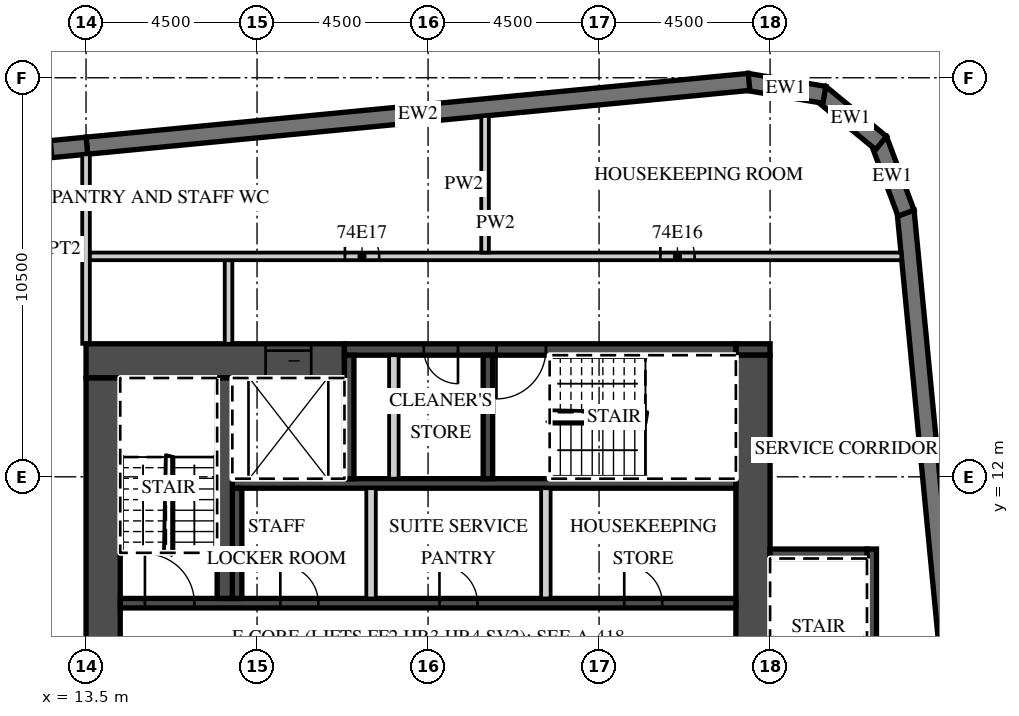
"""IFC4 building model, lengths in metres.
Left out: names, types, materials, properties, quantities, classifications, styles, units other than length and angle.
Written with IfcOpenShell. Run it as: python <this file> out.ifc"""

import sys

from ifc_helpers import new_model, si_unit, direction, frame, frame_2d, origin, place, context, subcontext, project, spatial, polyline, rectangle, outline, extrude, element, fill, save


model = new_model("IFC4")
c1 = context("Model", 3, precision=1e-05, world=origin(), true_north=direction((0.0, 1.0)))
c2 = subcontext(c1, "Body", "Model", "MODEL_VIEW")
j1 = project(units=[si_unit("LENGTHUNIT", "METRE"), si_unit("PLANEANGLEUNIT", "RADIAN")], contexts=[c1])
p1 = place(None, origin())
s1 = spatial("IfcSite", under=j1, at=p1, CompositionType="ELEMENT")
p2 = place(p1, origin())
s2 = spatial("IfcBuilding", under=s1, at=p2, CompositionType="ELEMENT")
p3 = place(p2, frame((0.0, 0.0, 294.9)))
s3 = spatial("IfcBuildingStorey", under=s2, at=p3, CompositionType="ELEMENT", Elevation=294.9)
p4 = place(p3, frame((38.132, -12.858, 0.0), z_axis=(0.0, 0.0, 1.0), x_axis=(-0.095847749461, 0.995396006082, 0.0)))
e1 = element("IfcWall", 1, at=p4, inside=s3, PredefinedType="SOLIDWALL", context=c2, shape_type="SweptSolid", body=[
    extrude(rectangle(XDim=32.0, YDim=0.45, at=frame_2d((16.0, 0.0))), origin(), (0.0, 0.0, 1.0), 3.02),
])
p5 = place(p3, frame((35.078, 18.938, 0.0), z_axis=(0.0, 0.0, 1.0), x_axis=(-0.350192909346, 0.936677599948, 0.0)))
e2 = element("IfcWall", 2, at=p5, inside=s3, PredefinedType="SOLIDWALL", context=c2, shape_type="SweptSolid", body=[
    extrude(outline(polyline([(0.0, -0.225), (2.071, -0.225), (1.95, 0.225), (0.121, 0.225), (0.0, -0.225)])), origin(), (0.0, 0.0, 1.0), 3.02),
])
p6 = place(p3, frame((34.421, 20.782, 0.0), z_axis=(0.0, 0.0, 1.0), x_axis=(-0.771593176315, 0.636116318187, 0.0)))
e3 = element("IfcWall", 3, at=p6, inside=s3, PredefinedType="SOLIDWALL", context=c2, shape_type="SweptSolid", body=[
    extrude(outline(polyline([(0.0, -0.225), (2.071, -0.225), (1.95, 0.225), (0.12, 0.225), (0.0, -0.225)])), origin(), (0.0, 0.0, 1.0), 3.02),
])
p7 = place(p3, frame((32.929, 22.051, 0.0), z_axis=(0.0, 0.0, 1.0), x_axis=(-0.986298144721, 0.164972633245, 0.0)))
e4 = element("IfcWall", 4, at=p7, inside=s3, PredefinedType="SOLIDWALL", context=c2, shape_type="SweptSolid", body=[
    extrude(outline(polyline([(0.0, -0.225), (2.07, -0.225), (1.95, 0.225), (0.121, 0.225), (0.0, -0.225)])), origin(), (0.0, 0.0, 1.0), 3.02),
])
p8 = place(p3, frame((30.946, 22.391, 0.0), z_axis=(0.0, 0.0, 1.0), x_axis=(-0.995396397117, -0.095843688398, 0.0)))
e5 = element("IfcWall", 5, at=p8, inside=s3, PredefinedType="SOLIDWALL", context=c2, shape_type="SweptSolid", body=[
    extrude(rectangle(XDim=17.505, YDim=0.45, at=frame_2d((8.752, 0.0))), origin(), (0.0, 0.0, 1.0), 3.02),
])
p9 = place(p3, frame((13.521, 20.713, 0.0), z_axis=(0.0, 0.0, 1.0), x_axis=(-0.995396277313, -0.095844932638, 0.0)))
e6 = element("IfcWall", 6, at=p9, inside=s3, PredefinedType="SOLIDWALL", context=c2, shape_type="SweptSolid", body=[
    extrude(rectangle(XDim=51.495, YDim=0.45, at=frame_2d((25.748, 0.0))), origin(), (0.0, 0.0, 1.0), 3.02),
])
p10 = place(p9, frame((0.91, 0.0, 0.45)))
e7 = element("IfcOpeningElement", 7, at=p10, cuts=e6, PredefinedType="OPENING", context=c2, shape_type="SweptSolid", body=[
    extrude(rectangle(XDim=2.7, YDim=2.25, at=frame_2d((1.35, 1.125))), frame((0.0, 0.235, 0.0), z_axis=(0.0, -1.0, 0.0), x_axis=(1.0, 0.0, 0.0)), (0.0, 0.0, 1.0), 0.47),
])
p11 = place(p9, frame((5.431, 0.0, 0.45)))
e8 = element("IfcOpeningElement", 8, at=p11, cuts=e6, PredefinedType="OPENING", context=c2, shape_type="SweptSolid", body=[
    extrude(rectangle(XDim=2.7, YDim=2.25, at=frame_2d((1.35, 1.125))), frame((0.0, 0.235, 0.0), z_axis=(0.0, -1.0, 0.0), x_axis=(1.0, 0.0, 0.0)), (0.0, 0.0, 1.0), 0.47),
])
p12 = place(p9, frame((9.952, 0.0, 0.45)))
e9 = element("IfcOpeningElement", 9, at=p12, cuts=e6, PredefinedType="OPENING", context=c2, shape_type="SweptSolid", body=[
    extrude(rectangle(XDim=2.7, YDim=2.25, at=frame_2d((1.35, 1.125))), frame((0.0, 0.235, 0.0), z_axis=(0.0, -1.0, 0.0), x_axis=(1.0, 0.0, 0.0)), (0.0, 0.0, 1.0), 0.47),
])
p13 = place(p9, frame((14.473, 0.0, 0.45)))
e10 = element("IfcOpeningElement", 10, at=p13, cuts=e6, PredefinedType="OPENING", context=c2, shape_type="SweptSolid", body=[
    extrude(rectangle(XDim=2.7, YDim=2.25, at=frame_2d((1.35, 1.125))), frame((0.0, 0.235, 0.0), z_axis=(0.0, -1.0, 0.0), x_axis=(1.0, 0.0, 0.0)), (0.0, 0.0, 1.0), 0.47),
])
p14 = place(p9, frame((18.994, 0.0, 0.45)))
e11 = element("IfcOpeningElement", 11, at=p14, cuts=e6, PredefinedType="OPENING", context=c2, shape_type="SweptSolid", body=[
    extrude(rectangle(XDim=2.7, YDim=2.25, at=frame_2d((1.35, 1.125))), frame((0.0, 0.235, 0.0), z_axis=(0.0, -1.0, 0.0), x_axis=(1.0, 0.0, 0.0)), (0.0, 0.0, 1.0), 0.47),
])
p15 = place(p9, frame((23.514, 0.0, 0.45)))
e12 = element("IfcOpeningElement", 12, at=p15, cuts=e6, PredefinedType="OPENING", context=c2, shape_type="SweptSolid", body=[
    extrude(rectangle(XDim=2.7, YDim=2.25, at=frame_2d((1.35, 1.125))), frame((0.0, 0.235, 0.0), z_axis=(0.0, -1.0, 0.0), x_axis=(1.0, 0.0, 0.0)), (0.0, 0.0, 1.0), 0.47),
])
p16 = place(p9, frame((28.035, 0.0, 0.45)))
e13 = element("IfcOpeningElement", 13, at=p16, cuts=e6, PredefinedType="OPENING", context=c2, shape_type="SweptSolid", body=[
    extrude(rectangle(XDim=2.7, YDim=2.25, at=frame_2d((1.35, 1.125))), frame((0.0, 0.235, 0.0), z_axis=(0.0, -1.0, 0.0), x_axis=(1.0, 0.0, 0.0)), (0.0, 0.0, 1.0), 0.47),
])
p17 = place(p9, frame((32.556, 0.0, 0.45)))
e14 = element("IfcOpeningElement", 14, at=p17, cuts=e6, PredefinedType="OPENING", context=c2, shape_type="SweptSolid", body=[
    extrude(rectangle(XDim=2.7, YDim=2.25, at=frame_2d((1.35, 1.125))), frame((0.0, 0.235, 0.0), z_axis=(0.0, -1.0, 0.0), x_axis=(1.0, 0.0, 0.0)), (0.0, 0.0, 1.0), 0.47),
])
p18 = place(p9, frame((37.077, 0.0, 0.45)))
e15 = element("IfcOpeningElement", 15, at=p18, cuts=e6, PredefinedType="OPENING", context=c2, shape_type="SweptSolid", body=[
    extrude(rectangle(XDim=2.7, YDim=2.25, at=frame_2d((1.35, 1.125))), frame((0.0, 0.235, 0.0), z_axis=(0.0, -1.0, 0.0), x_axis=(1.0, 0.0, 0.0)), (0.0, 0.0, 1.0), 0.47),
])
p19 = place(p9, frame((41.598, 0.0, 0.45)))
e16 = element("IfcOpeningElement", 16, at=p19, cuts=e6, PredefinedType="OPENING", context=c2, shape_type="SweptSolid", body=[
    extrude(rectangle(XDim=2.7, YDim=2.25, at=frame_2d((1.35, 1.125))), frame((0.0, 0.235, 0.0), z_axis=(0.0, -1.0, 0.0), x_axis=(1.0, 0.0, 0.0)), (0.0, 0.0, 1.0), 0.47),
])
p20 = place(p9, frame((46.118, 0.0, 0.45)))
e17 = element("IfcOpeningElement", 17, at=p20, cuts=e6, PredefinedType="OPENING", context=c2, shape_type="SweptSolid", body=[
    extrude(rectangle(XDim=2.7, YDim=2.25, at=frame_2d((1.35, 1.125))), frame((0.0, 0.235, 0.0), z_axis=(0.0, -1.0, 0.0), x_axis=(1.0, 0.0, 0.0)), (0.0, 0.0, 1.0), 0.47),
])
p21 = place(p3, frame((13.5, 15.5, 0.0), z_axis=(0.0, 0.0, 1.0), x_axis=(0.0, 1.0, 0.0)))
e18 = element("IfcWall", 18, at=p21, inside=s3, PredefinedType="PARTITIONING", context=c2, shape_type="SweptSolid", body=[
    extrude(rectangle(XDim=4.985, YDim=0.2, at=frame_2d((2.493, 0.0))), origin(), (0.0, 0.0, 1.0), 3.02),
])
p22 = place(p3, frame((13.5, 15.05, 0.0), z_axis=(0.0, 0.0, 1.0), x_axis=(1.0, 0.0, 0.0)))
e19 = element("IfcWall", 19, at=p22, inside=s3, PredefinedType="SHEAR", context=c2, shape_type="SweptSolid", body=[
    extrude(rectangle(XDim=6.8, YDim=0.9, at=frame_2d((3.4, 0.0))), origin(), (0.0, 0.0, 1.0), 3.02),
])
p23 = place(p22, frame((4.725, 0.0, 0.0)))
e20 = element("IfcOpeningElement", 20, at=p23, cuts=e19, PredefinedType="OPENING", context=c2, shape_type="SweptSolid", body=[
    extrude(rectangle(XDim=1.2, YDim=2.1, at=frame_2d((0.6, 1.05))), frame((0.0, 0.46, 0.0), z_axis=(0.0, -1.0, 0.0), x_axis=(1.0, 0.0, 0.0)), (0.0, 0.0, 1.0), 0.92),
])
p24 = place(p3, frame((30.6, 15.35, 0.0), z_axis=(0.0, 0.0, 1.0), x_axis=(1.0, 0.0, 0.0)))
e21 = element("IfcWall", 21, at=p24, inside=s3, PredefinedType="SHEAR", context=c2, shape_type="SweptSolid", body=[
    extrude(rectangle(XDim=0.9, YDim=0.3, at=frame_2d((0.45, 0.0))), origin(), (0.0, 0.0, 1.0), 3.02),
])
p25 = place(p3, frame((20.3, 15.35, 0.0), z_axis=(0.0, 0.0, 1.0), x_axis=(1.0, 0.0, 0.0)))
e22 = element("IfcWall", 22, at=p25, inside=s3, PredefinedType="SHEAR", context=c2, shape_type="SweptSolid", body=[
    extrude(rectangle(XDim=10.3, YDim=0.3, at=frame_2d((5.15, 0.0))), origin(), (0.0, 0.0, 1.0), 3.02),
])
p26 = place(p25, frame((4.0, 0.0, 0.0)))
e23 = element("IfcOpeningElement", 23, at=p26, cuts=e22, PredefinedType="OPENING", context=c2, shape_type="SweptSolid", body=[
    extrude(rectangle(XDim=1.3, YDim=2.1, at=frame_2d((0.65, 1.05))), frame((0.0, 0.16, 0.0), z_axis=(0.0, -1.0, 0.0), x_axis=(1.0, 0.0, 0.0)), (0.0, 0.0, 1.0), 0.32),
])
p27 = place(p25, frame((2.087, 0.0, 0.0)))
e24 = element("IfcOpeningElement", 24, at=p27, cuts=e22, PredefinedType="OPENING", context=c2, shape_type="SweptSolid", body=[
    extrude(rectangle(XDim=0.9, YDim=2.1, at=frame_2d((0.45, 1.05))), frame((0.0, 0.16, 0.0), z_axis=(0.0, -1.0, 0.0), x_axis=(1.0, 0.0, 0.0)), (0.0, 0.0, 1.0), 0.32),
])
p28 = place(p3, frame((31.05, 2.4, 0.0), z_axis=(0.0, 0.0, 1.0), x_axis=(0.0, 1.0, 0.0)))
e25 = element("IfcWall", 25, at=p28, inside=s3, PredefinedType="SHEAR", context=c2, shape_type="SweptSolid", body=[
    extrude(rectangle(XDim=12.8, YDim=0.9, at=frame_2d((6.4, 0.0))), origin(), (0.0, 0.0, 1.0), 3.02),
])
p29 = place(p28, frame((0.2, 0.0, 0.0)))
e26 = element("IfcOpeningElement", 26, at=p29, cuts=e25, PredefinedType="OPENING", context=c2, shape_type="SweptSolid", body=[
    extrude(rectangle(XDim=1.1, YDim=2.1, at=frame_2d((0.55, 1.05))), frame((0.0, 0.46, 0.0), z_axis=(0.0, -1.0, 0.0), x_axis=(1.0, 0.0, 0.0)), (0.0, 0.0, 1.0), 0.92),
])
p30 = place(p3, frame((13.95, 2.4, 0.0), z_axis=(0.0, 0.0, 1.0), x_axis=(0.0, 1.0, 0.0)))
e27 = element("IfcWall", 27, at=p30, inside=s3, PredefinedType="SHEAR", context=c2, shape_type="SweptSolid", body=[
    extrude(rectangle(XDim=12.2, YDim=0.9, at=frame_2d((6.1, 0.0))), origin(), (0.0, 0.0, 1.0), 3.02),
])
p31 = place(p3, frame((14.4, 8.675, 0.0), z_axis=(0.0, 0.0, 1.0), x_axis=(1.0, 0.0, 0.0)))
e28 = element("IfcWall", 28, at=p31, inside=s3, PredefinedType="SHEAR", context=c2, shape_type="SweptSolid", body=[
    extrude(rectangle(XDim=16.2, YDim=0.25, at=frame_2d((8.1, 0.0))), origin(), (0.0, 0.0, 1.0), 3.02),
])
p32 = place(p31, frame((0.65, 0.0, 0.0)))
e29 = element("IfcOpeningElement", 29, at=p32, cuts=e28, PredefinedType="OPENING", context=c2, shape_type="SweptSolid", body=[
    extrude(rectangle(XDim=1.3, YDim=2.1, at=frame_2d((0.65, 1.05))), frame((0.0, 0.135, 0.0), z_axis=(0.0, -1.0, 0.0), x_axis=(1.0, 0.0, 0.0)), (0.0, 0.0, 1.0), 0.27),
])
p33 = place(p31, frame((13.262, 0.0, 0.0)))
e30 = element("IfcOpeningElement", 30, at=p33, cuts=e28, PredefinedType="OPENING", context=c2, shape_type="SweptSolid", body=[
    extrude(rectangle(XDim=1.0, YDim=2.1, at=frame_2d((0.5, 1.05))), frame((0.0, 0.135, 0.0), z_axis=(0.0, -1.0, 0.0), x_axis=(1.0, 0.0, 0.0)), (0.0, 0.0, 1.0), 0.27),
])
p34 = place(p31, frame((8.4, 0.0, 0.0)))
e31 = element("IfcOpeningElement", 31, at=p34, cuts=e28, PredefinedType="OPENING", context=c2, shape_type="SweptSolid", body=[
    extrude(rectangle(XDim=1.0, YDim=2.1, at=frame_2d((0.5, 1.05))), frame((0.0, 0.135, 0.0), z_axis=(0.0, -1.0, 0.0), x_axis=(1.0, 0.0, 0.0)), (0.0, 0.0, 1.0), 0.27),
])
p35 = place(p31, frame((4.212, 0.0, 0.0)))
e32 = element("IfcOpeningElement", 32, at=p35, cuts=e28, PredefinedType="OPENING", context=c2, shape_type="SweptSolid", body=[
    extrude(rectangle(XDim=1.0, YDim=2.1, at=frame_2d((0.5, 1.05))), frame((0.0, 0.135, 0.0), z_axis=(0.0, -1.0, 0.0), x_axis=(1.0, 0.0, 0.0)), (0.0, 0.0, 1.0), 0.27),
])
p36 = place(p3, frame((17.35, 11.825, 0.0), z_axis=(0.0, 0.0, 1.0), x_axis=(1.0, 0.0, 0.0)))
e33 = element("IfcWall", 33, at=p36, inside=s3, PredefinedType="SHEAR", context=c2, shape_type="SweptSolid", body=[
    extrude(rectangle(XDim=13.25, YDim=0.25, at=frame_2d((6.625, 0.0))), origin(), (0.0, 0.0, 1.0), 3.02),
])
p37 = place(p3, frame((17.475, 8.8, 0.0), z_axis=(0.0, 0.0, 1.0), x_axis=(0.0, 1.0, 0.0)))
e34 = element("IfcWall", 34, at=p37, inside=s3, PredefinedType="SHEAR", context=c2, shape_type="SweptSolid", body=[
    extrude(rectangle(XDim=2.9, YDim=0.25, at=frame_2d((1.45, 0.0))), origin(), (0.0, 0.0, 1.0), 3.02),
])
for number, where, z_axis, x_axis in (
    (35, (25.6, 8.8, 0.0), (0.0, 0.0, 1.0), (0.0, 1.0, 0.0)),
    (36, (21.0, 8.8, 0.0), (0.0, 0.0, 1.0), (0.0, 1.0, 0.0)),
):
    element("IfcWall", number, at=place(p3, frame(where, z_axis=z_axis, x_axis=x_axis)), inside=s3, PredefinedType="PARTITIONING", context=c2, shape_type="SweptSolid", body=[
        extrude(rectangle(XDim=2.9, YDim=0.25, at=frame_2d((1.45, 0.0))), origin(), (0.0, 0.0, 1.0), 3.02),
    ])
p38 = place(p3, frame((17.15, 8.8, 0.0), z_axis=(0.0, 0.0, 1.0), x_axis=(0.0, 1.0, 0.0)))
e37 = element("IfcWall", 37, at=p38, inside=s3, PredefinedType="SHEAR", context=c2, shape_type="SweptSolid", body=[
    extrude(rectangle(XDim=5.8, YDim=0.4, at=frame_2d((2.9, 0.0))), origin(), (0.0, 0.0, 1.0), 3.02),
])
for number, where, z_axis, x_axis in (
    (38, (20.425, 11.95, 0.0), (0.0, 0.0, 1.0), (0.0, 1.0, 0.0)),
    (39, (24.075, 11.95, 0.0), (0.0, 0.0, 1.0), (0.0, 1.0, 0.0)),
):
    element("IfcWall", number, at=place(p3, frame(where, z_axis=z_axis, x_axis=x_axis)), inside=s3, PredefinedType="SHEAR", context=c2, shape_type="SweptSolid", body=[
        extrude(rectangle(XDim=3.25, YDim=0.25, at=frame_2d((1.625, 0.0))), origin(), (0.0, 0.0, 1.0), 3.02),
    ])
p39 = place(p3, frame((21.6, 11.95, 0.0), z_axis=(0.0, 0.0, 1.0), x_axis=(0.0, 1.0, 0.0)))
e40 = element("IfcWall", 40, at=p39, inside=s3, PredefinedType="PARTITIONING", context=c2, shape_type="SweptSolid", body=[
    extrude(rectangle(XDim=3.25, YDim=0.25, at=frame_2d((1.625, 0.0))), origin(), (0.0, 0.0, 1.0), 3.02),
])
p40 = place(p3, frame((34.175, 1.75, 0.0), z_axis=(0.0, 0.0, 1.0), x_axis=(0.0, 1.0, 0.0)))
e41 = element("IfcWall", 41, at=p40, inside=s3, PredefinedType="SHEAR", context=c2, shape_type="SweptSolid", body=[
    extrude(rectangle(XDim=8.35, YDim=0.25, at=frame_2d((4.175, 0.0))), origin(), (0.0, 0.0, 1.0), 3.02),
])
p41 = place(p3, frame((31.5, 9.975, 0.0), z_axis=(0.0, 0.0, 1.0), x_axis=(1.0, 0.0, 0.0)))
e42 = element("IfcWall", 42, at=p41, inside=s3, PredefinedType="SHEAR", context=c2, shape_type="SweptSolid", body=[
    extrude(rectangle(XDim=2.55, YDim=0.25, at=frame_2d((1.275, 0.0))), origin(), (0.0, 0.0, 1.0), 3.02),
])
p42 = place(p3, frame((17.25, 15.5, 0.0), z_axis=(0.0, 0.0, 1.0), x_axis=(0.0, 1.0, 0.0)))
e43 = element("IfcWall", 43, at=p42, inside=s3, PredefinedType="PARTITIONING", context=c2, shape_type="SweptSolid", body=[
    extrude(rectangle(XDim=2.2, YDim=0.2, at=frame_2d((1.1, 0.0))), origin(), (0.0, 0.0, 1.0), 3.02),
])
p43 = place(p3, frame((13.6, 17.8, 0.0), z_axis=(0.0, 0.0, 1.0), x_axis=(1.0, 0.0, 0.0)))
e44 = element("IfcWall", 44, at=p43, inside=s3, PredefinedType="PARTITIONING", context=c2, shape_type="SweptSolid", body=[
    extrude(rectangle(XDim=21.354, YDim=0.2, at=frame_2d((10.677, 0.0))), origin(), (0.0, 0.0, 1.0), 3.02),
])
p44 = place(p43, frame((15.012, 0.0, 0.0)))
e45 = element("IfcOpeningElement", 45, at=p44, cuts=e44, PredefinedType="OPENING", context=c2, shape_type="SweptSolid", body=[
    extrude(rectangle(XDim=0.9, YDim=2.1, at=frame_2d((0.45, 1.05))), frame((0.0, 0.11, 0.0), z_axis=(0.0, -1.0, 0.0), x_axis=(1.0, 0.0, 0.0)), (0.0, 0.0, 1.0), 0.22),
])
p45 = place(p43, frame((6.712, 0.0, 0.0)))
e46 = element("IfcOpeningElement", 46, at=p45, cuts=e44, PredefinedType="OPENING", context=c2, shape_type="SweptSolid", body=[
    extrude(rectangle(XDim=0.9, YDim=2.1, at=frame_2d((0.45, 1.05))), frame((0.0, 0.11, 0.0), z_axis=(0.0, -1.0, 0.0), x_axis=(1.0, 0.0, 0.0)), (0.0, 0.0, 1.0), 0.22),
])
p46 = place(p3, frame((24.0, 17.9, 0.0), z_axis=(0.0, 0.0, 1.0), x_axis=(0.0, 1.0, 0.0)))
e47 = element("IfcWall", 47, at=p46, inside=s3, PredefinedType="PARTITIONING", context=c2, shape_type="SweptSolid", body=[
    extrude(rectangle(XDim=3.597, YDim=0.2, at=frame_2d((1.798, 0.0))), origin(), (0.0, 0.0, 1.0), 3.02),
])
p47 = place(p10, origin())
e48 = element("IfcWindow", 48, at=p47, inside=s3, PartitioningType="SINGLE_PANEL", PredefinedType="WINDOW", context=c2, shape_type="SweptSolid", body=[
    extrude(rectangle(XDim=2.7, YDim=2.25, at=frame_2d((1.35, 1.125))), frame((0.0, 0.09, 0.0), z_axis=(0.0, -1.0, 0.0), x_axis=(1.0, 0.0, 0.0)), (0.0, 0.0, 1.0), 0.06),
])
fill(e7, e48)
p48 = place(p23, origin())
e49 = element("IfcDoor", 49, at=p48, inside=s3, OperationType="SLIDING_TO_LEFT", PredefinedType="DOOR", context=c2, shape_type="SweptSolid", body=[
    extrude(rectangle(XDim=1.2, YDim=2.1, at=frame_2d((0.6, 1.05))), frame((0.0, 0.025, 0.0), z_axis=(0.0, -1.0, 0.0), x_axis=(1.0, 0.0, 0.0)), (0.0, 0.0, 1.0), 0.05),
])
fill(e20, e49)
p49 = place(p32, origin())
e50 = element("IfcDoor", 50, at=p49, inside=s3, OperationType="SINGLE_SWING_LEFT", PredefinedType="DOOR", context=c2, shape_type="SweptSolid", body=[
    extrude(rectangle(XDim=1.3, YDim=2.1, at=frame_2d((0.65, 1.05))), frame((0.0, 0.025, 0.0), z_axis=(0.0, -1.0, 0.0), x_axis=(1.0, 0.0, 0.0)), (0.0, 0.0, 1.0), 0.05),
])
fill(e29, e50)
p50 = place(p26, origin())
e51 = element("IfcDoor", 51, at=p50, inside=s3, OperationType="SINGLE_SWING_LEFT", PredefinedType="DOOR", context=c2, shape_type="SweptSolid", body=[
    extrude(rectangle(XDim=1.3, YDim=2.1, at=frame_2d((0.65, 1.05))), frame((0.0, 0.025, 0.0), z_axis=(0.0, -1.0, 0.0), x_axis=(1.0, 0.0, 0.0)), (0.0, 0.0, 1.0), 0.05),
])
fill(e23, e51)
p51 = place(p27, origin())
e52 = element("IfcDoor", 52, at=p51, inside=s3, OperationType="SINGLE_SWING_RIGHT", PredefinedType="DOOR", context=c2, shape_type="SweptSolid", body=[
    extrude(rectangle(XDim=0.9, YDim=2.1, at=frame_2d((0.45, 1.05))), frame((0.0, 0.025, 0.0), z_axis=(0.0, -1.0, 0.0), x_axis=(1.0, 0.0, 0.0)), (0.0, 0.0, 1.0), 0.05),
])
fill(e24, e52)
p52 = place(p33, origin())
e53 = element("IfcDoor", 53, at=p52, inside=s3, OperationType="SINGLE_SWING_LEFT", PredefinedType="DOOR", context=c2, shape_type="SweptSolid", body=[
    extrude(rectangle(XDim=1.0, YDim=2.1, at=frame_2d((0.5, 1.05))), frame((0.0, 0.025, 0.0), z_axis=(0.0, -1.0, 0.0), x_axis=(1.0, 0.0, 0.0)), (0.0, 0.0, 1.0), 0.05),
])
fill(e30, e53)
p53 = place(p34, origin())
e54 = element("IfcDoor", 54, at=p53, inside=s3, OperationType="SINGLE_SWING_LEFT", PredefinedType="DOOR", context=c2, shape_type="SweptSolid", body=[
    extrude(rectangle(XDim=1.0, YDim=2.1, at=frame_2d((0.5, 1.05))), frame((0.0, 0.025, 0.0), z_axis=(0.0, -1.0, 0.0), x_axis=(1.0, 0.0, 0.0)), (0.0, 0.0, 1.0), 0.05),
])
fill(e31, e54)
p54 = place(p35, origin())
e55 = element("IfcDoor", 55, at=p54, inside=s3, OperationType="SINGLE_SWING_LEFT", PredefinedType="DOOR", context=c2, shape_type="SweptSolid", body=[
    extrude(rectangle(XDim=1.0, YDim=2.1, at=frame_2d((0.5, 1.05))), frame((0.0, 0.025, 0.0), z_axis=(0.0, -1.0, 0.0), x_axis=(1.0, 0.0, 0.0)), (0.0, 0.0, 1.0), 0.05),
])
fill(e32, e55)
p55 = place(p44, origin())
e56 = element("IfcDoor", 56, at=p55, inside=s3, OperationType="SINGLE_SWING_LEFT", PredefinedType="DOOR", context=c2, shape_type="SweptSolid", body=[
    extrude(rectangle(XDim=0.9, YDim=2.1, at=frame_2d((0.45, 1.05))), frame((0.0, 0.025, 0.0), z_axis=(0.0, -1.0, 0.0), x_axis=(1.0, 0.0, 0.0)), (0.0, 0.0, 1.0), 0.05),
])
fill(e45, e56)
p56 = place(p45, origin())
e57 = element("IfcDoor", 57, at=p56, inside=s3, OperationType="SINGLE_SWING_LEFT", PredefinedType="DOOR", context=c2, shape_type="SweptSolid", body=[
    extrude(rectangle(XDim=0.9, YDim=2.1, at=frame_2d((0.45, 1.05))), frame((0.0, 0.025, 0.0), z_axis=(0.0, -1.0, 0.0), x_axis=(1.0, 0.0, 0.0)), (0.0, 0.0, 1.0), 0.05),
])
fill(e46, e57)
save(model, sys.argv[1])
